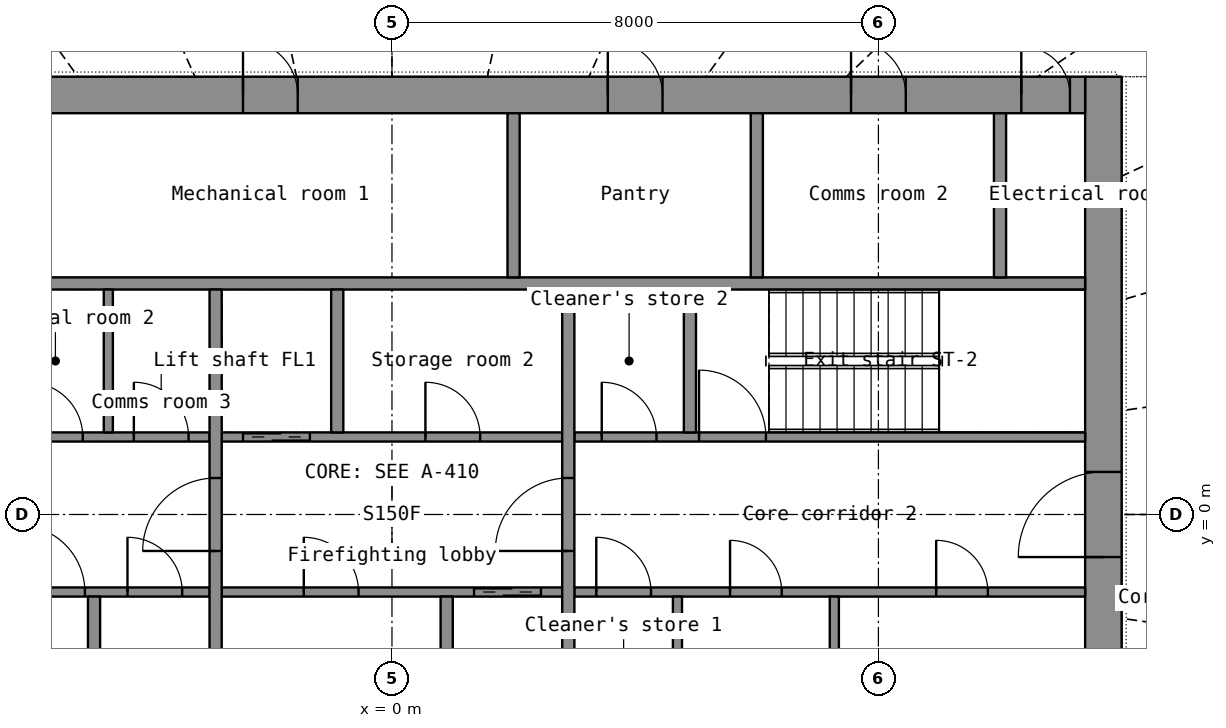
"""IFC4 building model, lengths in metres.
Left out: names, types, materials, properties, quantities, classifications, styles, units other than length and angle.
Written with IfcOpenShell. Run it as: python <this file> out.ifc"""

import sys

from ifc_helpers import new_model, si_unit, direction, frame, frame_2d, origin, place, context, subcontext, project, spatial, rectangle, extrude, element, fill, save


model = new_model("IFC4")
c1 = context("Model", 3, precision=1e-05, world=origin(), true_north=direction((0.0, 1.0)))
c2 = subcontext(c1, "Body", "Model", "MODEL_VIEW")
j1 = project(units=[si_unit("LENGTHUNIT", "METRE"), si_unit("PLANEANGLEUNIT", "RADIAN")], contexts=[c1])
p1 = place(None, origin())
s1 = spatial("IfcSite", under=j1, at=p1, CompositionType="ELEMENT")
p2 = place(p1, origin())
s2 = spatial("IfcBuilding", under=s1, at=p2, CompositionType="ELEMENT")
p3 = place(p2, frame((0.0, 0.0, 66.7)))
s3 = spatial("IfcBuildingStorey", under=s2, at=p3, CompositionType="ELEMENT", Elevation=66.7)
p4 = place(p3, frame((11.7, -7.2, 0.0), z_axis=(0.0, 0.0, 1.0), x_axis=(0.0, 1.0, 0.0)))
e1 = element("IfcWall", 1, at=p4, inside=s3, PredefinedType="SHEAR", context=c2, shape_type="SweptSolid", body=[
    extrude(rectangle(XDim=14.4, YDim=0.6, at=frame_2d((7.2, 0.0))), origin(), (0.0, 0.0, 1.0), 3.3),
])
p5 = place(p4, frame((6.5, 0.0, 0.0)))
e2 = element("IfcOpeningElement", 2, at=p5, cuts=e1, PredefinedType="OPENING", context=c2, shape_type="SweptSolid", body=[
    extrude(rectangle(XDim=1.4, YDim=2.2, at=frame_2d((0.7, 1.1))), frame((0.0, 0.31, 0.0), z_axis=(0.0, -1.0, 0.0), x_axis=(1.0, 0.0, 0.0)), (0.0, 0.0, 1.0), 0.62),
])
p6 = place(p3, frame((-11.4, 6.9, 0.0), z_axis=(0.0, 0.0, 1.0), x_axis=(1.0, 0.0, 0.0)))
e3 = element("IfcWall", 3, at=p6, inside=s3, PredefinedType="SHEAR", context=c2, shape_type="SweptSolid", body=[
    extrude(rectangle(XDim=22.8, YDim=0.6, at=frame_2d((11.4, 0.0))), origin(), (0.0, 0.0, 1.0), 3.3),
])
p7 = place(p6, frame((1.85, 0.0, 0.0)))
e4 = element("IfcOpeningElement", 4, at=p7, cuts=e3, PredefinedType="OPENING", context=c2, shape_type="SweptSolid", body=[
    extrude(rectangle(XDim=1.1, YDim=2.2, at=frame_2d((0.55, 1.1))), frame((0.0, 0.31, 0.0), z_axis=(0.0, -1.0, 0.0), x_axis=(1.0, 0.0, 0.0)), (0.0, 0.0, 1.0), 0.62),
])
p8 = place(p6, frame((8.95, 0.0, 0.0)))
e5 = element("IfcOpeningElement", 5, at=p8, cuts=e3, PredefinedType="OPENING", context=c2, shape_type="SweptSolid", body=[
    extrude(rectangle(XDim=0.9, YDim=2.1, at=frame_2d((0.45, 1.05))), frame((0.0, 0.31, 0.0), z_axis=(0.0, -1.0, 0.0), x_axis=(1.0, 0.0, 0.0)), (0.0, 0.0, 1.0), 0.62),
])
p9 = place(p6, frame((14.95, 0.0, 0.0)))
e6 = element("IfcOpeningElement", 6, at=p9, cuts=e3, PredefinedType="OPENING", context=c2, shape_type="SweptSolid", body=[
    extrude(rectangle(XDim=0.9, YDim=2.1, at=frame_2d((0.45, 1.05))), frame((0.0, 0.31, 0.0), z_axis=(0.0, -1.0, 0.0), x_axis=(1.0, 0.0, 0.0)), (0.0, 0.0, 1.0), 0.62),
])
p10 = place(p6, frame((18.95, 0.0, 0.0)))
e7 = element("IfcOpeningElement", 7, at=p10, cuts=e3, PredefinedType="OPENING", context=c2, shape_type="SweptSolid", body=[
    extrude(rectangle(XDim=0.9, YDim=2.1, at=frame_2d((0.45, 1.05))), frame((0.0, 0.31, 0.0), z_axis=(0.0, -1.0, 0.0), x_axis=(1.0, 0.0, 0.0)), (0.0, 0.0, 1.0), 0.62),
])
p11 = place(p6, frame((0.25, 0.0, 0.0)))
e8 = element("IfcOpeningElement", 8, at=p11, cuts=e3, PredefinedType="OPENING", context=c2, shape_type="SweptSolid", body=[
    extrude(rectangle(XDim=0.8, YDim=2.05, at=frame_2d((0.4, 1.025))), frame((0.0, 0.31, 0.0), z_axis=(0.0, -1.0, 0.0), x_axis=(1.0, 0.0, 0.0)), (0.0, 0.0, 1.0), 0.62),
])
p12 = place(p6, frame((21.75, 0.0, 0.0)))
e9 = element("IfcOpeningElement", 9, at=p12, cuts=e3, PredefinedType="OPENING", context=c2, shape_type="SweptSolid", body=[
    extrude(rectangle(XDim=0.8, YDim=2.05, at=frame_2d((0.4, 1.025))), frame((0.0, 0.31, 0.0), z_axis=(0.0, -1.0, 0.0), x_axis=(1.0, 0.0, 0.0)), (0.0, 0.0, 1.0), 0.62),
])
p13 = place(p3, frame((-11.4, 3.8, 0.0), z_axis=(0.0, 0.0, 1.0), x_axis=(1.0, 0.0, 0.0)))
e10 = element("IfcWall", 10, at=p13, inside=s3, PredefinedType="SHEAR", context=c2, shape_type="SweptSolid", body=[
    extrude(rectangle(XDim=22.8, YDim=0.2, at=frame_2d((11.4, 0.0))), origin(), (0.0, 0.0, 1.0), 3.3),
])
p14 = place(p3, frame((10.0, 3.9, 0.0), z_axis=(0.0, 0.0, 1.0), x_axis=(0.0, 1.0, 0.0)))
e11 = element("IfcWall", 11, at=p14, inside=s3, PredefinedType="SHEAR", context=c2, shape_type="SweptSolid", body=[
    extrude(rectangle(XDim=2.7, YDim=0.2, at=frame_2d((1.35, 0.0))), origin(), (0.0, 0.0, 1.0), 3.3),
])
for number, where, z_axis, x_axis in (
    (12, (2.0, 3.9, 0.0), (0.0, 0.0, 1.0), (0.0, 1.0, 0.0)),
    (13, (6.0, 3.9, 0.0), (0.0, 0.0, 1.0), (0.0, 1.0, 0.0)),
):
    element("IfcWall", number, at=place(p3, frame(where, z_axis=z_axis, x_axis=x_axis)), inside=s3, PredefinedType="PARTITIONING", context=c2, shape_type="SweptSolid", body=[
        extrude(rectangle(XDim=2.7, YDim=0.2, at=frame_2d((1.35, 0.0))), origin(), (0.0, 0.0, 1.0), 3.3),
    ])
p15 = place(p3, frame((-11.4, -1.275, 0.0), z_axis=(0.0, 0.0, 1.0), x_axis=(1.0, 0.0, 0.0)))
e14 = element("IfcWall", 14, at=p15, inside=s3, PredefinedType="SHEAR", context=c2, shape_type="SweptSolid", body=[
    extrude(rectangle(XDim=8.4, YDim=0.15, at=frame_2d((4.2, 0.0))), origin(), (0.0, 0.0, 1.0), 3.3),
])
p16 = place(p15, frame((5.25, 0.0, 0.0)))
e15 = element("IfcOpeningElement", 15, at=p16, cuts=e14, PredefinedType="OPENING", context=c2, shape_type="SweptSolid", body=[
    extrude(rectangle(XDim=1.1, YDim=2.15, at=frame_2d((0.55, 1.075))), frame((0.0, 0.085, 0.0), z_axis=(0.0, -1.0, 0.0), x_axis=(1.0, 0.0, 0.0)), (0.0, 0.0, 1.0), 0.17),
])
p17 = place(p15, frame((7.05, 0.0, 0.0)))
e16 = element("IfcOpeningElement", 16, at=p17, cuts=e14, PredefinedType="OPENING", context=c2, shape_type="SweptSolid", body=[
    extrude(rectangle(XDim=0.9, YDim=2.1, at=frame_2d((0.45, 1.05))), frame((0.0, 0.085, 0.0), z_axis=(0.0, -1.0, 0.0), x_axis=(1.0, 0.0, 0.0)), (0.0, 0.0, 1.0), 0.17),
])
p18 = place(p3, frame((-2.8, -1.275, 0.0), z_axis=(0.0, 0.0, 1.0), x_axis=(1.0, 0.0, 0.0)))
e17 = element("IfcWall", 17, at=p18, inside=s3, PredefinedType="SHEAR", context=c2, shape_type="SweptSolid", body=[
    extrude(rectangle(XDim=5.6, YDim=0.15, at=frame_2d((2.8, 0.0))), origin(), (0.0, 0.0, 1.0), 3.3),
])
p19 = place(p18, frame((4.15, 0.0, 0.0)))
e18 = element("IfcOpeningElement", 18, at=p19, cuts=e17, PredefinedType="OPENING", context=c2, shape_type="SweptSolid", body=[
    extrude(rectangle(XDim=1.1, YDim=2.2, at=frame_2d((0.55, 1.1))), frame((0.0, 0.085, 0.0), z_axis=(0.0, -1.0, 0.0), x_axis=(1.0, 0.0, 0.0)), (0.0, 0.0, 1.0), 0.17),
])
p20 = place(p18, frame((1.35, 0.0, 0.0)))
e19 = element("IfcOpeningElement", 19, at=p20, cuts=e17, PredefinedType="OPENING", context=c2, shape_type="SweptSolid", body=[
    extrude(rectangle(XDim=0.9, YDim=2.1, at=frame_2d((0.45, 1.05))), frame((0.0, 0.085, 0.0), z_axis=(0.0, -1.0, 0.0), x_axis=(1.0, 0.0, 0.0)), (0.0, 0.0, 1.0), 0.17),
])
p21 = place(p3, frame((3.0, -1.275, 0.0), z_axis=(0.0, 0.0, 1.0), x_axis=(1.0, 0.0, 0.0)))
e20 = element("IfcWall", 20, at=p21, inside=s3, PredefinedType="PARTITIONING", context=c2, shape_type="SweptSolid", body=[
    extrude(rectangle(XDim=8.4, YDim=0.15, at=frame_2d((4.2, 0.0))), origin(), (0.0, 0.0, 1.0), 3.3),
])
p22 = place(p21, frame((0.36, 0.0, 0.0)))
e21 = element("IfcOpeningElement", 21, at=p22, cuts=e20, PredefinedType="OPENING", context=c2, shape_type="SweptSolid", body=[
    extrude(rectangle(XDim=0.9, YDim=2.1, at=frame_2d((0.45, 1.05))), frame((0.0, 0.085, 0.0), z_axis=(0.0, -1.0, 0.0), x_axis=(1.0, 0.0, 0.0)), (0.0, 0.0, 1.0), 0.17),
])
p23 = place(p21, frame((2.56, 0.0, 0.0)))
e22 = element("IfcOpeningElement", 22, at=p23, cuts=e20, PredefinedType="OPENING", context=c2, shape_type="SweptSolid", body=[
    extrude(rectangle(XDim=0.85, YDim=2.1, at=frame_2d((0.425, 1.05))), frame((0.0, 0.085, 0.0), z_axis=(0.0, -1.0, 0.0), x_axis=(1.0, 0.0, 0.0)), (0.0, 0.0, 1.0), 0.17),
])
p24 = place(p21, frame((5.95, 0.0, 0.0)))
e23 = element("IfcOpeningElement", 23, at=p24, cuts=e20, PredefinedType="OPENING", context=c2, shape_type="SweptSolid", body=[
    extrude(rectangle(XDim=0.85, YDim=2.1, at=frame_2d((0.425, 1.05))), frame((0.0, 0.085, 0.0), z_axis=(0.0, -1.0, 0.0), x_axis=(1.0, 0.0, 0.0)), (0.0, 0.0, 1.0), 0.17),
])
p25 = place(p3, frame((-11.4, 1.275, 0.0), z_axis=(0.0, 0.0, 1.0), x_axis=(1.0, 0.0, 0.0)))
e24 = element("IfcWall", 24, at=p25, inside=s3, PredefinedType="PARTITIONING", context=c2, shape_type="SweptSolid", body=[
    extrude(rectangle(XDim=8.4, YDim=0.15, at=frame_2d((4.2, 0.0))), origin(), (0.0, 0.0, 1.0), 3.3),
])
p26 = place(p25, frame((0.768, 0.0, 0.0)))
e25 = element("IfcOpeningElement", 25, at=p26, cuts=e24, PredefinedType="OPENING", context=c2, shape_type="SweptSolid", body=[
    extrude(rectangle(XDim=0.85, YDim=2.1, at=frame_2d((0.425, 1.05))), frame((0.0, 0.085, 0.0), z_axis=(0.0, -1.0, 0.0), x_axis=(1.0, 0.0, 0.0)), (0.0, 0.0, 1.0), 0.17),
])
p27 = place(p25, frame((3.302, 0.0, 0.0)))
e26 = element("IfcOpeningElement", 26, at=p27, cuts=e24, PredefinedType="OPENING", context=c2, shape_type="SweptSolid", body=[
    extrude(rectangle(XDim=0.85, YDim=2.1, at=frame_2d((0.425, 1.05))), frame((0.0, 0.085, 0.0), z_axis=(0.0, -1.0, 0.0), x_axis=(1.0, 0.0, 0.0)), (0.0, 0.0, 1.0), 0.17),
])
p28 = place(p25, frame((5.415, 0.0, 0.0)))
e27 = element("IfcOpeningElement", 27, at=p28, cuts=e24, PredefinedType="OPENING", context=c2, shape_type="SweptSolid", body=[
    extrude(rectangle(XDim=0.9, YDim=2.1, at=frame_2d((0.45, 1.05))), frame((0.0, 0.085, 0.0), z_axis=(0.0, -1.0, 0.0), x_axis=(1.0, 0.0, 0.0)), (0.0, 0.0, 1.0), 0.17),
])
p29 = place(p25, frame((7.155, 0.0, 0.0)))
e28 = element("IfcOpeningElement", 28, at=p29, cuts=e24, PredefinedType="OPENING", context=c2, shape_type="SweptSolid", body=[
    extrude(rectangle(XDim=0.9, YDim=2.1, at=frame_2d((0.45, 1.05))), frame((0.0, 0.085, 0.0), z_axis=(0.0, -1.0, 0.0), x_axis=(1.0, 0.0, 0.0)), (0.0, 0.0, 1.0), 0.17),
])
p30 = place(p3, frame((-2.8, 1.275, 0.0), z_axis=(0.0, 0.0, 1.0), x_axis=(1.0, 0.0, 0.0)))
e29 = element("IfcWall", 29, at=p30, inside=s3, PredefinedType="SHEAR", context=c2, shape_type="SweptSolid", body=[
    extrude(rectangle(XDim=5.6, YDim=0.15, at=frame_2d((2.8, 0.0))), origin(), (0.0, 0.0, 1.0), 3.3),
])
p31 = place(p30, frame((0.35, 0.0, 0.0)))
e30 = element("IfcOpeningElement", 30, at=p31, cuts=e29, PredefinedType="OPENING", context=c2, shape_type="SweptSolid", body=[
    extrude(rectangle(XDim=1.1, YDim=2.2, at=frame_2d((0.55, 1.1))), frame((0.0, 0.085, 0.0), z_axis=(0.0, -1.0, 0.0), x_axis=(1.0, 0.0, 0.0)), (0.0, 0.0, 1.0), 0.17),
])
p32 = place(p30, frame((3.35, 0.0, 0.0)))
e31 = element("IfcOpeningElement", 31, at=p32, cuts=e29, PredefinedType="OPENING", context=c2, shape_type="SweptSolid", body=[
    extrude(rectangle(XDim=0.9, YDim=2.1, at=frame_2d((0.45, 1.05))), frame((0.0, 0.085, 0.0), z_axis=(0.0, -1.0, 0.0), x_axis=(1.0, 0.0, 0.0)), (0.0, 0.0, 1.0), 0.17),
])
p33 = place(p3, frame((3.0, 1.275, 0.0), z_axis=(0.0, 0.0, 1.0), x_axis=(1.0, 0.0, 0.0)))
e32 = element("IfcWall", 32, at=p33, inside=s3, PredefinedType="SHEAR", context=c2, shape_type="SweptSolid", body=[
    extrude(rectangle(XDim=8.4, YDim=0.15, at=frame_2d((4.2, 0.0))), origin(), (0.0, 0.0, 1.0), 3.3),
])
p34 = place(p33, frame((2.05, 0.0, 0.0)))
e33 = element("IfcOpeningElement", 33, at=p34, cuts=e32, PredefinedType="OPENING", context=c2, shape_type="SweptSolid", body=[
    extrude(rectangle(XDim=1.1, YDim=2.15, at=frame_2d((0.55, 1.075))), frame((0.0, 0.085, 0.0), z_axis=(0.0, -1.0, 0.0), x_axis=(1.0, 0.0, 0.0)), (0.0, 0.0, 1.0), 0.17),
])
p35 = place(p33, frame((0.45, 0.0, 0.0)))
e34 = element("IfcOpeningElement", 34, at=p35, cuts=e32, PredefinedType="OPENING", context=c2, shape_type="SweptSolid", body=[
    extrude(rectangle(XDim=0.9, YDim=2.1, at=frame_2d((0.45, 1.05))), frame((0.0, 0.085, 0.0), z_axis=(0.0, -1.0, 0.0), x_axis=(1.0, 0.0, 0.0)), (0.0, 0.0, 1.0), 0.17),
])
p36 = place(p3, frame((-2.9, -3.7, 0.0), z_axis=(0.0, 0.0, 1.0), x_axis=(0.0, 1.0, 0.0)))
e35 = element("IfcWall", 35, at=p36, inside=s3, PredefinedType="SHEAR", context=c2, shape_type="SweptSolid", body=[
    extrude(rectangle(XDim=7.4, YDim=0.2, at=frame_2d((3.7, 0.0))), origin(), (0.0, 0.0, 1.0), 3.3),
])
p37 = place(p36, frame((3.1, 0.0, 0.0)))
e36 = element("IfcOpeningElement", 36, at=p37, cuts=e35, PredefinedType="OPENING", context=c2, shape_type="SweptSolid", body=[
    extrude(rectangle(XDim=1.2, YDim=2.2, at=frame_2d((0.6, 1.1))), frame((0.0, 0.11, 0.0), z_axis=(0.0, -1.0, 0.0), x_axis=(1.0, 0.0, 0.0)), (0.0, 0.0, 1.0), 0.22),
])
p38 = place(p3, frame((2.9, -3.7, 0.0), z_axis=(0.0, 0.0, 1.0), x_axis=(0.0, 1.0, 0.0)))
e37 = element("IfcWall", 37, at=p38, inside=s3, PredefinedType="SHEAR", context=c2, shape_type="SweptSolid", body=[
    extrude(rectangle(XDim=7.4, YDim=0.2, at=frame_2d((3.7, 0.0))), origin(), (0.0, 0.0, 1.0), 3.3),
])
p39 = place(p38, frame((3.1, 0.0, 0.0)))
e38 = element("IfcOpeningElement", 38, at=p39, cuts=e37, PredefinedType="OPENING", context=c2, shape_type="SweptSolid", body=[
    extrude(rectangle(XDim=1.2, YDim=2.2, at=frame_2d((0.6, 1.1))), frame((0.0, 0.11, 0.0), z_axis=(0.0, -1.0, 0.0), x_axis=(1.0, 0.0, 0.0)), (0.0, 0.0, 1.0), 0.22),
])
for number, where, z_axis, x_axis in (
    (39, (-0.9, 1.35, 0.0), (0.0, 0.0, 1.0), (0.0, 1.0, 0.0)),
    (40, (0.9, -3.7, 0.0), (0.0, 0.0, 1.0), (0.0, 1.0, 0.0)),
    (41, (-4.9, -3.7, 0.0), (0.0, 0.0, 1.0), (0.0, 1.0, 0.0)),
    (42, (4.9, 1.35, 0.0), (0.0, 0.0, 1.0), (0.0, 1.0, 0.0)),
):
    element("IfcWall", number, at=place(p3, frame(where, z_axis=z_axis, x_axis=x_axis)), inside=s3, PredefinedType="SHEAR", context=c2, shape_type="SweptSolid", body=[
        extrude(rectangle(XDim=2.35, YDim=0.2, at=frame_2d((1.175, 0.0))), origin(), (0.0, 0.0, 1.0), 3.3),
    ])
for number, where, z_axis, x_axis in (
    (43, (-4.665, 1.35, 0.0), (0.0, 0.0, 1.0), (0.0, 1.0, 0.0)),
    (44, (4.695, -3.7, 0.0), (0.0, 0.0, 1.0), (0.0, 1.0, 0.0)),
    (45, (7.275, -3.7, 0.0), (0.0, 0.0, 1.0), (0.0, 1.0, 0.0)),
):
    element("IfcWall", number, at=place(p3, frame(where, z_axis=z_axis, x_axis=x_axis)), inside=s3, PredefinedType="PARTITIONING", context=c2, shape_type="SweptSolid", body=[
        extrude(rectangle(XDim=2.35, YDim=0.15, at=frame_2d((1.175, 0.0))), origin(), (0.0, 0.0, 1.0), 3.3),
    ])
p40 = place(p8, origin())
e46 = element("IfcDoor", 46, at=p40, inside=s3, OperationType="SINGLE_SWING_LEFT", PredefinedType="DOOR", context=c2, shape_type="SweptSolid", body=[
    extrude(rectangle(XDim=0.9, YDim=2.1, at=frame_2d((0.45, 1.05))), frame((0.0, 0.025, 0.0), z_axis=(0.0, -1.0, 0.0), x_axis=(1.0, 0.0, 0.0)), (0.0, 0.0, 1.0), 0.05),
])
fill(e5, e46)
p41 = place(p9, origin())
e47 = element("IfcDoor", 47, at=p41, inside=s3, OperationType="SINGLE_SWING_LEFT", PredefinedType="DOOR", context=c2, shape_type="SweptSolid", body=[
    extrude(rectangle(XDim=0.9, YDim=2.1, at=frame_2d((0.45, 1.05))), frame((0.0, 0.025, 0.0), z_axis=(0.0, -1.0, 0.0), x_axis=(1.0, 0.0, 0.0)), (0.0, 0.0, 1.0), 0.05),
])
fill(e6, e47)
p42 = place(p10, origin())
e48 = element("IfcDoor", 48, at=p42, inside=s3, OperationType="SINGLE_SWING_LEFT", PredefinedType="DOOR", context=c2, shape_type="SweptSolid", body=[
    extrude(rectangle(XDim=0.9, YDim=2.1, at=frame_2d((0.45, 1.05))), frame((0.0, 0.025, 0.0), z_axis=(0.0, -1.0, 0.0), x_axis=(1.0, 0.0, 0.0)), (0.0, 0.0, 1.0), 0.05),
])
fill(e7, e48)
p43 = place(p12, origin())
e49 = element("IfcDoor", 49, at=p43, inside=s3, OperationType="SINGLE_SWING_LEFT", PredefinedType="DOOR", context=c2, shape_type="SweptSolid", body=[
    extrude(rectangle(XDim=0.8, YDim=2.05, at=frame_2d((0.4, 1.025))), frame((0.0, 0.025, 0.0), z_axis=(0.0, -1.0, 0.0), x_axis=(1.0, 0.0, 0.0)), (0.0, 0.0, 1.0), 0.05),
])
fill(e9, e49)
p44 = place(p5, origin())
e50 = element("IfcDoor", 50, at=p44, inside=s3, OperationType="DOUBLE_DOOR_SINGLE_SWING", PredefinedType="DOOR", context=c2, shape_type="SweptSolid", body=[
    extrude(rectangle(XDim=1.4, YDim=2.2, at=frame_2d((0.7, 1.1))), frame((0.0, 0.025, 0.0), z_axis=(0.0, -1.0, 0.0), x_axis=(1.0, 0.0, 0.0)), (0.0, 0.0, 1.0), 0.05),
])
fill(e2, e50)
p45 = place(p37, origin())
e51 = element("IfcDoor", 51, at=p45, inside=s3, OperationType="SINGLE_SWING_LEFT", PredefinedType="DOOR", context=c2, shape_type="SweptSolid", body=[
    extrude(rectangle(XDim=1.2, YDim=2.2, at=frame_2d((0.6, 1.1))), frame((0.0, 0.025, 0.0), z_axis=(0.0, -1.0, 0.0), x_axis=(1.0, 0.0, 0.0)), (0.0, 0.0, 1.0), 0.05),
])
fill(e36, e51)
p46 = place(p39, origin())
e52 = element("IfcDoor", 52, at=p46, inside=s3, OperationType="SINGLE_SWING_LEFT", PredefinedType="DOOR", context=c2, shape_type="SweptSolid", body=[
    extrude(rectangle(XDim=1.2, YDim=2.2, at=frame_2d((0.6, 1.1))), frame((0.0, 0.025, 0.0), z_axis=(0.0, -1.0, 0.0), x_axis=(1.0, 0.0, 0.0)), (0.0, 0.0, 1.0), 0.05),
])
fill(e38, e52)
p47 = place(p31, origin())
e53 = element("IfcDoor", 53, at=p47, inside=s3, OperationType="DOUBLE_DOOR_SLIDING", PredefinedType="DOOR", context=c2, shape_type="SweptSolid", body=[
    extrude(rectangle(XDim=1.1, YDim=2.2, at=frame_2d((0.55, 1.1))), frame((0.0, 0.025, 0.0), z_axis=(0.0, -1.0, 0.0), x_axis=(1.0, 0.0, 0.0)), (0.0, 0.0, 1.0), 0.05),
])
fill(e30, e53)
p48 = place(p19, origin())
e54 = element("IfcDoor", 54, at=p48, inside=s3, OperationType="DOUBLE_DOOR_SLIDING", PredefinedType="DOOR", context=c2, shape_type="SweptSolid", body=[
    extrude(rectangle(XDim=1.1, YDim=2.2, at=frame_2d((0.55, 1.1))), frame((0.0, 0.025, 0.0), z_axis=(0.0, -1.0, 0.0), x_axis=(1.0, 0.0, 0.0)), (0.0, 0.0, 1.0), 0.05),
])
fill(e18, e54)
p49 = place(p16, origin())
e55 = element("IfcDoor", 55, at=p49, inside=s3, OperationType="SINGLE_SWING_LEFT", PredefinedType="DOOR", context=c2, shape_type="SweptSolid", body=[
    extrude(rectangle(XDim=1.1, YDim=2.15, at=frame_2d((0.55, 1.075))), frame((0.0, 0.025, 0.0), z_axis=(0.0, -1.0, 0.0), x_axis=(1.0, 0.0, 0.0)), (0.0, 0.0, 1.0), 0.05),
])
fill(e15, e55)
p50 = place(p34, origin())
e56 = element("IfcDoor", 56, at=p50, inside=s3, OperationType="SINGLE_SWING_LEFT", PredefinedType="DOOR", context=c2, shape_type="SweptSolid", body=[
    extrude(rectangle(XDim=1.1, YDim=2.15, at=frame_2d((0.55, 1.075))), frame((0.0, 0.025, 0.0), z_axis=(0.0, -1.0, 0.0), x_axis=(1.0, 0.0, 0.0)), (0.0, 0.0, 1.0), 0.05),
])
fill(e33, e56)
p51 = place(p28, origin())
e57 = element("IfcDoor", 57, at=p51, inside=s3, OperationType="SINGLE_SWING_LEFT", PredefinedType="DOOR", context=c2, shape_type="SweptSolid", body=[
    extrude(rectangle(XDim=0.9, YDim=2.1, at=frame_2d((0.45, 1.05))), frame((0.0, 0.025, 0.0), z_axis=(0.0, -1.0, 0.0), x_axis=(1.0, 0.0, 0.0)), (0.0, 0.0, 1.0), 0.05),
])
fill(e27, e57)
p52 = place(p29, origin())
e58 = element("IfcDoor", 58, at=p52, inside=s3, OperationType="SINGLE_SWING_LEFT", PredefinedType="DOOR", context=c2, shape_type="SweptSolid", body=[
    extrude(rectangle(XDim=0.9, YDim=2.1, at=frame_2d((0.45, 1.05))), frame((0.0, 0.025, 0.0), z_axis=(0.0, -1.0, 0.0), x_axis=(1.0, 0.0, 0.0)), (0.0, 0.0, 1.0), 0.05),
])
fill(e28, e58)
p53 = place(p22, origin())
e59 = element("IfcDoor", 59, at=p53, inside=s3, OperationType="SINGLE_SWING_LEFT", PredefinedType="DOOR", context=c2, shape_type="SweptSolid", body=[
    extrude(rectangle(XDim=0.9, YDim=2.1, at=frame_2d((0.45, 1.05))), frame((0.0, 0.025, 0.0), z_axis=(0.0, -1.0, 0.0), x_axis=(1.0, 0.0, 0.0)), (0.0, 0.0, 1.0), 0.05),
])
fill(e21, e59)
p54 = place(p23, origin())
e60 = element("IfcDoor", 60, at=p54, inside=s3, OperationType="SINGLE_SWING_LEFT", PredefinedType="DOOR", context=c2, shape_type="SweptSolid", body=[
    extrude(rectangle(XDim=0.85, YDim=2.1, at=frame_2d((0.425, 1.05))), frame((0.0, 0.025, 0.0), z_axis=(0.0, -1.0, 0.0), x_axis=(1.0, 0.0, 0.0)), (0.0, 0.0, 1.0), 0.05),
])
fill(e22, e60)
p55 = place(p24, origin())
e61 = element("IfcDoor", 61, at=p55, inside=s3, OperationType="SINGLE_SWING_LEFT", PredefinedType="DOOR", context=c2, shape_type="SweptSolid", body=[
    extrude(rectangle(XDim=0.85, YDim=2.1, at=frame_2d((0.425, 1.05))), frame((0.0, 0.025, 0.0), z_axis=(0.0, -1.0, 0.0), x_axis=(1.0, 0.0, 0.0)), (0.0, 0.0, 1.0), 0.05),
])
fill(e23, e61)
p56 = place(p32, origin())
e62 = element("IfcDoor", 62, at=p56, inside=s3, OperationType="SINGLE_SWING_LEFT", PredefinedType="DOOR", context=c2, shape_type="SweptSolid", body=[
    extrude(rectangle(XDim=0.9, YDim=2.1, at=frame_2d((0.45, 1.05))), frame((0.0, 0.025, 0.0), z_axis=(0.0, -1.0, 0.0), x_axis=(1.0, 0.0, 0.0)), (0.0, 0.0, 1.0), 0.05),
])
fill(e31, e62)
p57 = place(p20, origin())
e63 = element("IfcDoor", 63, at=p57, inside=s3, OperationType="SINGLE_SWING_LEFT", PredefinedType="DOOR", context=c2, shape_type="SweptSolid", body=[
    extrude(rectangle(XDim=0.9, YDim=2.1, at=frame_2d((0.45, 1.05))), frame((0.0, 0.025, 0.0), z_axis=(0.0, -1.0, 0.0), x_axis=(1.0, 0.0, 0.0)), (0.0, 0.0, 1.0), 0.05),
])
fill(e19, e63)
p58 = place(p35, origin())
e64 = element("IfcDoor", 64, at=p58, inside=s3, OperationType="SINGLE_SWING_LEFT", PredefinedType="DOOR", context=c2, shape_type="SweptSolid", body=[
    extrude(rectangle(XDim=0.9, YDim=2.1, at=frame_2d((0.45, 1.05))), frame((0.0, 0.025, 0.0), z_axis=(0.0, -1.0, 0.0), x_axis=(1.0, 0.0, 0.0)), (0.0, 0.0, 1.0), 0.05),
])
fill(e34, e64)
p59 = place(p17, origin())
e65 = element("IfcDoor", 65, at=p59, inside=s3, OperationType="SINGLE_SWING_LEFT", PredefinedType="DOOR", context=c2, shape_type="SweptSolid", body=[
    extrude(rectangle(XDim=0.9, YDim=2.1, at=frame_2d((0.45, 1.05))), frame((0.0, 0.025, 0.0), z_axis=(0.0, -1.0, 0.0), x_axis=(1.0, 0.0, 0.0)), (0.0, 0.0, 1.0), 0.05),
])
fill(e16, e65)
save(model, sys.argv[1])
